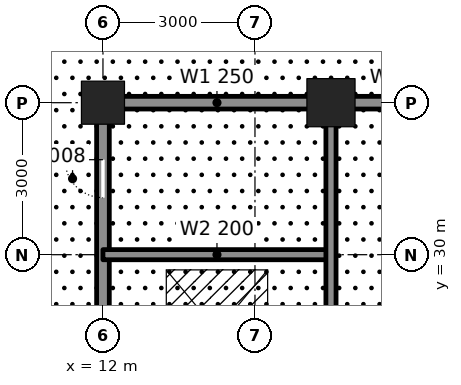
"""IFC4 building model, lengths in metres.
Left out: names, types, materials, properties, quantities, classifications, styles, units other than length and angle.
Written with IfcOpenShell. Run it as: python <this file> out.ifc"""

import sys

from ifc_helpers import new_model, si_unit, direction, frame, frame_2d, origin, origin_2d, place, context, subcontext, project, spatial, rectangle, hollow_rectangle, extrude, element, fill, save


model = new_model("IFC4")
c1 = context("Model", 3, precision=1e-05, world=origin(), true_north=direction((0.0, 1.0)))
c2 = subcontext(c1, "Body", "Model", "MODEL_VIEW")
j1 = project(units=[si_unit("LENGTHUNIT", "METRE"), si_unit("PLANEANGLEUNIT", "RADIAN")], contexts=[c1])
p1 = place(None, origin())
s1 = spatial("IfcSite", under=j1, at=p1, CompositionType="ELEMENT")
p2 = place(p1, origin())
s2 = spatial("IfcBuilding", under=s1, at=p2, CompositionType="ELEMENT")
p3 = place(p2, frame((0.0, 0.0, -5.0)))
s3 = spatial("IfcBuildingStorey", under=s2, at=p3, CompositionType="ELEMENT", Elevation=-5.0)
p4 = place(p3, frame((12.0, 33.0, -0.3), z_axis=(0.0, 0.0, 1.0), x_axis=(1.0, 0.0, 0.0)))
e1 = element("IfcColumn", 1, at=p4, inside=s3, PredefinedType="COLUMN", context=c2, shape_type="SweptSolid", body=[
    extrude(hollow_rectangle(XDim=0.85, YDim=0.85, WallThickness=0.085, at=origin_2d()), origin(), (0.0, 0.0, 1.0), 5.3),
])
p5 = place(p3, frame((16.5, 33.0, -0.3), z_axis=(0.0, 0.0, 1.0), x_axis=(1.0, 0.0, 0.0)))
e2 = element("IfcColumn", 2, at=p5, inside=s3, PredefinedType="COLUMN", context=c2, shape_type="SweptSolid", body=[
    extrude(hollow_rectangle(XDim=0.95, YDim=0.95, WallThickness=0.095, at=origin_2d()), origin(), (0.0, 0.0, 1.0), 5.3),
])
p6 = place(p3, frame((12.0, 24.25, 0.0), z_axis=(0.0, 0.0, 1.0), x_axis=(0.0, 1.0, 0.0)))
e3 = element("IfcWall", 3, at=p6, inside=s3, PredefinedType="SOLIDWALL", context=c2, shape_type="SweptSolid", body=[
    extrude(rectangle(XDim=8.5, YDim=0.25, at=frame_2d((4.25, 0.0))), origin(), (0.0, 0.0, 1.0), 3.873),
])
p7 = place(p6, frame((0.65, 0.0, 0.0)))
e4 = element("IfcOpeningElement", 4, at=p7, cuts=e3, PredefinedType="OPENING", context=c2, shape_type="SweptSolid", body=[
    extrude(rectangle(XDim=1.2, YDim=2.1, at=frame_2d((0.6, 1.05))), frame((0.0, 0.135, 0.0), z_axis=(0.0, -1.0, 0.0), x_axis=(1.0, 0.0, 0.0)), (0.0, 0.0, 1.0), 0.27),
])
p8 = place(p6, frame((6.875, 0.0, 0.0)))
e5 = element("IfcOpeningElement", 5, at=p8, cuts=e3, PredefinedType="OPENING", context=c2, shape_type="SweptSolid", body=[
    extrude(rectangle(XDim=0.75, YDim=2.1, at=frame_2d((0.375, 1.05))), frame((0.0, 0.135, 0.0), z_axis=(0.0, -1.0, 0.0), x_axis=(1.0, 0.0, 0.0)), (0.0, 0.0, 1.0), 0.27),
])
p9 = place(p3, frame((12.0, 30.0, 0.0), z_axis=(0.0, 0.0, 1.0), x_axis=(1.0, 0.0, 0.0)))
e6 = element("IfcWall", 6, at=p9, inside=s3, PredefinedType="SOLIDWALL", context=c2, shape_type="SweptSolid", body=[
    extrude(rectangle(XDim=4.5, YDim=0.2, at=frame_2d((2.25, 0.0))), origin(), (0.0, 0.0, 1.0), 4.8),
])
p10 = place(p3, frame((12.25, 33.0, 0.0), z_axis=(0.0, 0.0, 1.0), x_axis=(1.0, 0.0, 0.0)))
e7 = element("IfcWall", 7, at=p10, inside=s3, PredefinedType="SOLIDWALL", context=c2, shape_type="SweptSolid", body=[
    extrude(rectangle(XDim=4.0, YDim=0.25, at=frame_2d((2.0, 0.0))), origin(), (0.0, 0.0, 1.0), 3.941),
])
p11 = place(p3, frame((16.75, 33.0, 0.0), z_axis=(0.0, 0.0, 1.0), x_axis=(1.0, 0.0, 0.0)))
e8 = element("IfcWall", 8, at=p11, inside=s3, PredefinedType="SOLIDWALL", context=c2, shape_type="SweptSolid", body=[
    extrude(rectangle(XDim=2.5, YDim=0.25, at=frame_2d((1.25, 0.0))), origin(), (0.0, 0.0, 1.0), 3.941),
])
p12 = place(p3, frame((16.5, 24.25, 0.0), z_axis=(0.0, 0.0, 1.0), x_axis=(0.0, 1.0, 0.0)))
e9 = element("IfcWall", 9, at=p12, inside=s3, PredefinedType="SOLIDWALL", context=c2, shape_type="SweptSolid", body=[
    extrude(rectangle(XDim=8.5, YDim=0.2, at=frame_2d((4.25, 0.0))), origin(), (0.0, 0.0, 1.0), 3.873),
])
p13 = place(p8, origin())
e10 = element("IfcDoor", 10, at=p13, inside=s3, OperationType="SINGLE_SWING_RIGHT", PredefinedType="DOOR", context=c2, shape_type="SweptSolid", body=[
    extrude(rectangle(XDim=0.75, YDim=2.1, at=frame_2d((0.375, 1.05))), frame((0.0, 0.025, 0.0), z_axis=(0.0, -1.0, 0.0), x_axis=(1.0, 0.0, 0.0)), (0.0, 0.0, 1.0), 0.05),
])
fill(e5, e10)
save(model, sys.argv[1])
